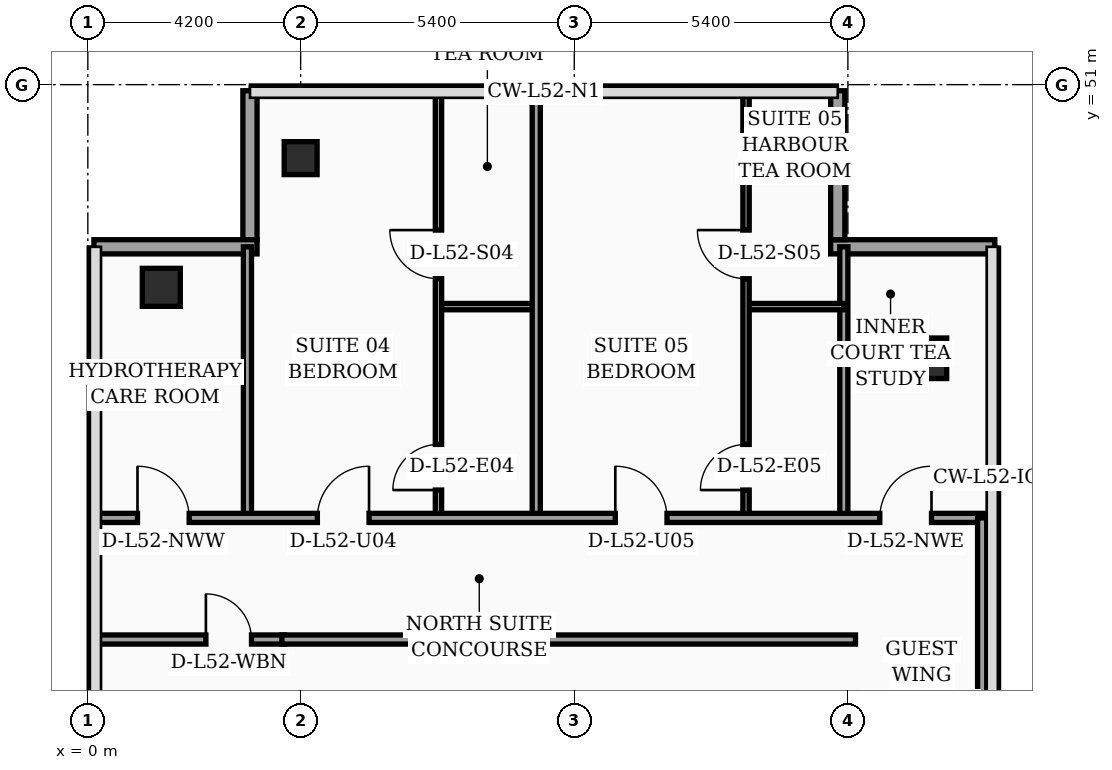
"""IFC4 building model, lengths in metres.
Left out: names, types, materials, properties, quantities, classifications, styles, units other than length and angle.
Written with IfcOpenShell. Run it as: python <this file> out.ifc"""

import sys

from ifc_helpers import new_model, si_unit, direction, frame, frame_2d, origin, origin_2d, place, context, subcontext, project, spatial, rectangle, hollow_rectangle, extrude, element, fill, save


model = new_model("IFC4")
c1 = context("Model", 3, precision=1e-05, world=origin(), true_north=direction((0.0, 1.0)))
c2 = subcontext(c1, "Body", "Model", "MODEL_VIEW")
j1 = project(units=[si_unit("LENGTHUNIT", "METRE"), si_unit("PLANEANGLEUNIT", "RADIAN")], contexts=[c1])
p1 = place(None, origin())
s1 = spatial("IfcSite", under=j1, at=p1, CompositionType="ELEMENT")
p2 = place(p1, origin())
s2 = spatial("IfcBuilding", under=s1, at=p2, CompositionType="ELEMENT")
p3 = place(p2, frame((0.0, 0.0, 211.0)))
s3 = spatial("IfcBuildingStorey", under=s2, at=p3, CompositionType="ELEMENT", Elevation=211.0)
p4 = place(p3, frame((1.45, 47.0, 0.0), z_axis=(0.0, 0.0, 1.0), x_axis=(1.0, 0.0, 0.0)))
e1 = element("IfcColumn", 1, at=p4, inside=s3, PredefinedType="COLUMN", context=c2, shape_type="SweptSolid", body=[
    extrude(hollow_rectangle(XDim=0.75, YDim=0.75, WallThickness=0.032, at=origin_2d()), origin(), (0.0, 0.0, 1.0), 3.56),
])
p5 = place(p3, frame((4.2, 49.55, 0.0), z_axis=(0.0, 0.0, 1.0), x_axis=(1.0, 0.0, 0.0)))
e2 = element("IfcColumn", 2, at=p5, inside=s3, PredefinedType="COLUMN", context=c2, shape_type="SweptSolid", body=[
    extrude(hollow_rectangle(XDim=0.65, YDim=0.65, WallThickness=0.028, at=origin_2d()), origin(), (0.0, 0.0, 1.0), 3.56),
])
p6 = place(p3, frame((16.55, 45.6, 0.0), z_axis=(0.0, 0.0, 1.0), x_axis=(1.0, 0.0, 0.0)))
e3 = element("IfcColumn", 3, at=p6, inside=s3, PredefinedType="COLUMN", context=c2, shape_type="SweptSolid", body=[
    extrude(rectangle(XDim=0.8, YDim=0.8, at=origin_2d()), origin(), (0.0, 0.0, 1.0), 3.56),
])
p7 = place(p3, frame((17.9, 47.8, 0.0), z_axis=(0.0, 0.0, 1.0), x_axis=(-1.0, 0.0, 0.0)))
e4 = element("IfcWall", 4, at=p7, inside=s3, PredefinedType="SOLIDWALL", context=c2, shape_type="SweptSolid", body=[
    extrude(rectangle(XDim=3.24, YDim=0.28, at=frame_2d((1.62, 0.0))), origin(), (0.0, 0.0, 1.0), 3.56),
])
p8 = place(p3, frame((14.8, 47.94, 0.0), z_axis=(0.0, 0.0, 1.0), x_axis=(0.0, 1.0, 0.0)))
e5 = element("IfcWall", 5, at=p8, inside=s3, PredefinedType="SOLIDWALL", context=c2, shape_type="SweptSolid", body=[
    extrude(rectangle(XDim=2.94, YDim=0.28, at=frame_2d((1.47, 0.0))), origin(), (0.0, 0.0, 1.0), 3.56),
])
p9 = place(p3, frame((3.2, 50.88, 0.0), z_axis=(0.0, 0.0, 1.0), x_axis=(0.0, -1.0, 0.0)))
e6 = element("IfcWall", 6, at=p9, inside=s3, PredefinedType="SOLIDWALL", context=c2, shape_type="SweptSolid", body=[
    extrude(rectangle(XDim=2.94, YDim=0.28, at=frame_2d((1.47, 0.0))), origin(), (0.0, 0.0, 1.0), 3.09),
])
p10 = place(p3, frame((3.34, 47.8, 0.0), z_axis=(0.0, 0.0, 1.0), x_axis=(-1.0, 0.0, 0.0)))
e7 = element("IfcWall", 7, at=p10, inside=s3, PredefinedType="SOLIDWALL", context=c2, shape_type="SweptSolid", body=[
    extrude(rectangle(XDim=3.22, YDim=0.28, at=frame_2d((1.61, 0.0))), origin(), (0.0, 0.0, 1.0), 3.09),
])
p11 = place(p3, frame((0.08, 40.05, 0.0), z_axis=(0.0, 0.0, 1.0), x_axis=(1.0, 0.0, 0.0)))
e8 = element("IfcWall", 8, at=p11, inside=s3, PredefinedType="PARTITIONING", context=c2, shape_type="SweptSolid", body=[
    extrude(rectangle(XDim=3.8, YDim=0.18, at=frame_2d((1.9, 0.0))), origin(), (0.0, 0.0, 1.0), 2.94),
])
p12 = place(p11, frame((2.25, 0.0, 0.0)))
e9 = element("IfcOpeningElement", 9, at=p12, cuts=e8, PredefinedType="OPENING", context=c2, shape_type="SweptSolid", body=[
    extrude(rectangle(XDim=0.9, YDim=2.15, at=frame_2d((0.45, 1.075))), frame((0.0, 0.1, 0.0), z_axis=(0.0, -1.0, 0.0), x_axis=(1.0, 0.0, 0.0)), (0.0, 0.0, 1.0), 0.2),
])
p13 = place(p3, frame((3.15, 42.45, 0.0), z_axis=(0.0, 0.0, 1.0), x_axis=(0.0, 1.0, 0.0)))
e10 = element("IfcWall", 10, at=p13, inside=s3, PredefinedType="PARTITIONING", context=c2, shape_type="SweptSolid", body=[
    extrude(rectangle(XDim=5.35, YDim=0.16, at=frame_2d((2.675, 0.0))), origin(), (0.0, 0.0, 1.0), 3.14),
])
p14 = place(p3, frame((14.92, 42.45, 0.0), z_axis=(0.0, 0.0, 1.0), x_axis=(0.0, 1.0, 0.0)))
e11 = element("IfcWall", 11, at=p14, inside=s3, PredefinedType="PARTITIONING", context=c2, shape_type="SweptSolid", body=[
    extrude(rectangle(XDim=5.35, YDim=0.16, at=frame_2d((2.675, 0.0))), origin(), (0.0, 0.0, 1.0), 3.09),
])
p15 = place(p3, frame((6.92, 46.62, 0.0), z_axis=(0.0, 0.0, 1.0), x_axis=(1.0, 0.0, 0.0)))
e12 = element("IfcWall", 12, at=p15, inside=s3, PredefinedType="PARTITIONING", context=c2, shape_type="SweptSolid", body=[
    extrude(rectangle(XDim=1.93, YDim=0.125, at=frame_2d((0.965, 0.0))), origin(), (0.0, 0.0, 1.0), 3.56),
])
p16 = place(p3, frame((6.92, 42.45, 0.0), z_axis=(0.0, 0.0, 1.0), x_axis=(0.0, 1.0, 0.0)))
e13 = element("IfcWall", 13, at=p16, inside=s3, PredefinedType="PARTITIONING", context=c2, shape_type="SweptSolid", body=[
    extrude(rectangle(XDim=8.49, YDim=0.125, at=frame_2d((4.245, 0.0))), origin(), (0.0, 0.0, 1.0), 3.09),
])
p17 = place(p16, frame((0.55, 0.0, 0.0)))
e14 = element("IfcOpeningElement", 14, at=p17, cuts=e13, PredefinedType="OPENING", context=c2, shape_type="SweptSolid", body=[
    extrude(rectangle(XDim=0.9, YDim=2.15, at=frame_2d((0.45, 1.075))), frame((0.0, 0.073, 0.0), z_axis=(0.0, -1.0, 0.0), x_axis=(1.0, 0.0, 0.0)), (0.0, 0.0, 1.0), 0.145),
])
p18 = place(p16, frame((4.72, 0.0, 0.0)))
e15 = element("IfcOpeningElement", 15, at=p18, cuts=e13, PredefinedType="OPENING", context=c2, shape_type="SweptSolid", body=[
    extrude(rectangle(XDim=0.96, YDim=2.2, at=frame_2d((0.48, 1.1))), frame((0.0, 0.073, 0.0), z_axis=(0.0, -1.0, 0.0), x_axis=(1.0, 0.0, 0.0)), (0.0, 0.0, 1.0), 0.145),
])
p19 = place(p3, frame((12.99, 46.62, 0.0), z_axis=(0.0, 0.0, 1.0), x_axis=(1.0, 0.0, 0.0)))
e16 = element("IfcWall", 16, at=p19, inside=s3, PredefinedType="PARTITIONING", context=c2, shape_type="SweptSolid", body=[
    extrude(rectangle(XDim=1.93, YDim=0.125, at=frame_2d((0.965, 0.0))), origin(), (0.0, 0.0, 1.0), 3.09),
])
p20 = place(p3, frame((12.99, 42.45, 0.0), z_axis=(0.0, 0.0, 1.0), x_axis=(0.0, 1.0, 0.0)))
e17 = element("IfcWall", 17, at=p20, inside=s3, PredefinedType="PARTITIONING", context=c2, shape_type="SweptSolid", body=[
    extrude(rectangle(XDim=8.49, YDim=0.125, at=frame_2d((4.245, 0.0))), origin(), (0.0, 0.0, 1.0), 3.09),
])
p21 = place(p20, frame((0.55, 0.0, 0.0)))
e18 = element("IfcOpeningElement", 18, at=p21, cuts=e17, PredefinedType="OPENING", context=c2, shape_type="SweptSolid", body=[
    extrude(rectangle(XDim=0.9, YDim=2.15, at=frame_2d((0.45, 1.075))), frame((0.0, 0.073, 0.0), z_axis=(0.0, -1.0, 0.0), x_axis=(1.0, 0.0, 0.0)), (0.0, 0.0, 1.0), 0.145),
])
p22 = place(p20, frame((4.72, 0.0, 0.0)))
e19 = element("IfcOpeningElement", 19, at=p22, cuts=e17, PredefinedType="OPENING", context=c2, shape_type="SweptSolid", body=[
    extrude(rectangle(XDim=0.96, YDim=2.2, at=frame_2d((0.48, 1.1))), frame((0.0, 0.073, 0.0), z_axis=(0.0, -1.0, 0.0), x_axis=(1.0, 0.0, 0.0)), (0.0, 0.0, 1.0), 0.145),
])
p23 = place(p3, frame((8.85, 42.45, 0.0), z_axis=(0.0, 0.0, 1.0), x_axis=(0.0, 1.0, 0.0)))
e20 = element("IfcWall", 20, at=p23, inside=s3, PredefinedType="PARTITIONING", context=c2, shape_type="SweptSolid", body=[
    extrude(rectangle(XDim=8.49, YDim=0.16, at=frame_2d((4.245, 0.0))), origin(), (0.0, 0.0, 1.0), 3.09),
])
p24 = place(p3, frame((0.08, 42.45, 0.0), z_axis=(0.0, 0.0, 1.0), x_axis=(1.0, 0.0, 0.0)))
e21 = element("IfcWall", 21, at=p24, inside=s3, PredefinedType="PARTITIONING", context=c2, shape_type="SweptSolid", body=[
    extrude(rectangle(XDim=17.77, YDim=0.18, at=frame_2d((8.885, 0.0))), origin(), (0.0, 0.0, 1.0), 2.94),
])
p25 = place(p24, frame((0.9, 0.0, 0.0)))
e22 = element("IfcOpeningElement", 22, at=p25, cuts=e21, PredefinedType="OPENING", context=c2, shape_type="SweptSolid", body=[
    extrude(rectangle(XDim=1.02, YDim=2.2, at=frame_2d((0.51, 1.1))), frame((0.0, 0.1, 0.0), z_axis=(0.0, -1.0, 0.0), x_axis=(1.0, 0.0, 0.0)), (0.0, 0.0, 1.0), 0.2),
])
p26 = place(p24, frame((4.45, 0.0, 0.0)))
e23 = element("IfcOpeningElement", 23, at=p26, cuts=e21, PredefinedType="OPENING", context=c2, shape_type="SweptSolid", body=[
    extrude(rectangle(XDim=1.02, YDim=2.2, at=frame_2d((0.51, 1.1))), frame((0.0, 0.1, 0.0), z_axis=(0.0, -1.0, 0.0), x_axis=(1.0, 0.0, 0.0)), (0.0, 0.0, 1.0), 0.2),
])
p27 = place(p24, frame((10.33, 0.0, 0.0)))
e24 = element("IfcOpeningElement", 24, at=p27, cuts=e21, PredefinedType="OPENING", context=c2, shape_type="SweptSolid", body=[
    extrude(rectangle(XDim=1.02, YDim=2.2, at=frame_2d((0.51, 1.1))), frame((0.0, 0.1, 0.0), z_axis=(0.0, -1.0, 0.0), x_axis=(1.0, 0.0, 0.0)), (0.0, 0.0, 1.0), 0.2),
])
p28 = place(p24, frame((15.55, 0.0, 0.0)))
e25 = element("IfcOpeningElement", 25, at=p28, cuts=e21, PredefinedType="OPENING", context=c2, shape_type="SweptSolid", body=[
    extrude(rectangle(XDim=1.02, YDim=2.2, at=frame_2d((0.51, 1.1))), frame((0.0, 0.1, 0.0), z_axis=(0.0, -1.0, 0.0), x_axis=(1.0, 0.0, 0.0)), (0.0, 0.0, 1.0), 0.2),
])
p29 = place(p3, frame((17.65, 24.3, 0.0), z_axis=(0.0, 0.0, 1.0), x_axis=(0.0, 1.0, 0.0)))
e26 = element("IfcWall", 26, at=p29, inside=s3, PredefinedType="PARTITIONING", context=c2, shape_type="SweptSolid", body=[
    extrude(rectangle(XDim=18.15, YDim=0.18, at=frame_2d((9.075, 0.0))), origin(), (0.0, 0.0, 1.0), 2.94),
])
p30 = place(p3, frame((3.83, 40.05, 0.0), z_axis=(0.0, 0.0, 1.0), x_axis=(1.0, 0.0, 0.0)))
e27 = element("IfcWall", 27, at=p30, inside=s3, PredefinedType="PARTITIONING", context=c2, shape_type="SweptSolid", body=[
    extrude(rectangle(XDim=11.32, YDim=0.18, at=frame_2d((5.66, 0.0))), origin(), (0.0, 0.0, 1.0), 2.94),
])
p31 = place(p12, origin())
e28 = element("IfcDoor", 28, at=p31, inside=s3, OperationType="SINGLE_SWING_LEFT", PredefinedType="DOOR", context=c2, shape_type="SweptSolid", body=[
    extrude(rectangle(XDim=0.9, YDim=2.15, at=frame_2d((0.45, 1.075))), frame((0.0, 0.025, 0.0), z_axis=(0.0, -1.0, 0.0), x_axis=(1.0, 0.0, 0.0)), (0.0, 0.0, 1.0), 0.05),
])
fill(e9, e28)
p32 = place(p17, origin())
e29 = element("IfcDoor", 29, at=p32, inside=s3, OperationType="SINGLE_SWING_LEFT", PredefinedType="DOOR", context=c2, shape_type="SweptSolid", body=[
    extrude(rectangle(XDim=0.9, YDim=2.15, at=frame_2d((0.45, 1.075))), frame((0.0, 0.025, 0.0), z_axis=(0.0, -1.0, 0.0), x_axis=(1.0, 0.0, 0.0)), (0.0, 0.0, 1.0), 0.05),
])
fill(e14, e29)
p33 = place(p18, origin())
e30 = element("IfcDoor", 30, at=p33, inside=s3, OperationType="SINGLE_SWING_RIGHT", PredefinedType="DOOR", context=c2, shape_type="SweptSolid", body=[
    extrude(rectangle(XDim=0.96, YDim=2.2, at=frame_2d((0.48, 1.1))), frame((0.0, 0.025, 0.0), z_axis=(0.0, -1.0, 0.0), x_axis=(1.0, 0.0, 0.0)), (0.0, 0.0, 1.0), 0.05),
])
fill(e15, e30)
p34 = place(p21, origin())
e31 = element("IfcDoor", 31, at=p34, inside=s3, OperationType="SINGLE_SWING_LEFT", PredefinedType="DOOR", context=c2, shape_type="SweptSolid", body=[
    extrude(rectangle(XDim=0.9, YDim=2.15, at=frame_2d((0.45, 1.075))), frame((0.0, 0.025, 0.0), z_axis=(0.0, -1.0, 0.0), x_axis=(1.0, 0.0, 0.0)), (0.0, 0.0, 1.0), 0.05),
])
fill(e18, e31)
p35 = place(p22, origin())
e32 = element("IfcDoor", 32, at=p35, inside=s3, OperationType="SINGLE_SWING_RIGHT", PredefinedType="DOOR", context=c2, shape_type="SweptSolid", body=[
    extrude(rectangle(XDim=0.96, YDim=2.2, at=frame_2d((0.48, 1.1))), frame((0.0, 0.025, 0.0), z_axis=(0.0, -1.0, 0.0), x_axis=(1.0, 0.0, 0.0)), (0.0, 0.0, 1.0), 0.05),
])
fill(e19, e32)
p36 = place(p25, origin())
e33 = element("IfcDoor", 33, at=p36, inside=s3, OperationType="SINGLE_SWING_LEFT", PredefinedType="DOOR", context=c2, shape_type="SweptSolid", body=[
    extrude(rectangle(XDim=1.02, YDim=2.2, at=frame_2d((0.51, 1.1))), frame((0.0, 0.025, 0.0), z_axis=(0.0, -1.0, 0.0), x_axis=(1.0, 0.0, 0.0)), (0.0, 0.0, 1.0), 0.05),
])
fill(e22, e33)
p37 = place(p26, origin())
e34 = element("IfcDoor", 34, at=p37, inside=s3, OperationType="SINGLE_SWING_RIGHT", PredefinedType="DOOR", context=c2, shape_type="SweptSolid", body=[
    extrude(rectangle(XDim=1.02, YDim=2.2, at=frame_2d((0.51, 1.1))), frame((0.0, 0.025, 0.0), z_axis=(0.0, -1.0, 0.0), x_axis=(1.0, 0.0, 0.0)), (0.0, 0.0, 1.0), 0.05),
])
fill(e23, e34)
p38 = place(p27, origin())
e35 = element("IfcDoor", 35, at=p38, inside=s3, OperationType="SINGLE_SWING_LEFT", PredefinedType="DOOR", context=c2, shape_type="SweptSolid", body=[
    extrude(rectangle(XDim=1.02, YDim=2.2, at=frame_2d((0.51, 1.1))), frame((0.0, 0.025, 0.0), z_axis=(0.0, -1.0, 0.0), x_axis=(1.0, 0.0, 0.0)), (0.0, 0.0, 1.0), 0.05),
])
fill(e24, e35)
p39 = place(p28, origin())
e36 = element("IfcDoor", 36, at=p39, inside=s3, OperationType="SINGLE_SWING_RIGHT", PredefinedType="DOOR", context=c2, shape_type="SweptSolid", body=[
    extrude(rectangle(XDim=1.02, YDim=2.2, at=frame_2d((0.51, 1.1))), frame((0.0, 0.025, 0.0), z_axis=(0.0, -1.0, 0.0), x_axis=(1.0, 0.0, 0.0)), (0.0, 0.0, 1.0), 0.05),
])
fill(e25, e36)
save(model, sys.argv[1])
